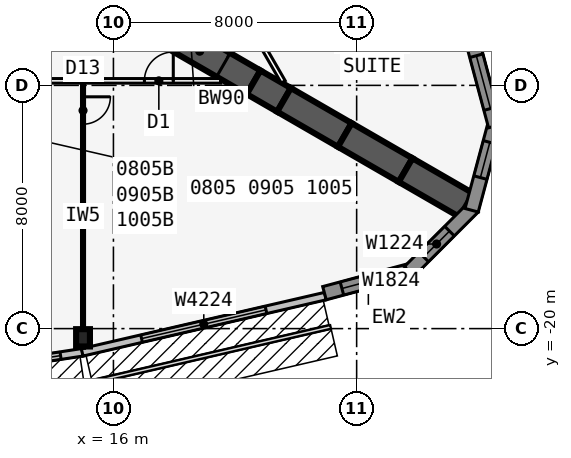
"""IFC4 building model, lengths in metres.
Left out: names, types, materials, properties, quantities, classifications, styles, units other than length and angle.
Written with IfcOpenShell. Run it as: python <this file> out.ifc"""

import sys

from ifc_helpers import new_model, si_unit, direction, frame, frame_2d, origin, origin_2d, place, context, subcontext, project, spatial, polyline, rectangle, i_section, outline, extrude, element, fill, save


model = new_model("IFC4")
c1 = context("Model", 3, precision=1e-05, world=origin(), true_north=direction((0.0, 1.0)))
c2 = subcontext(c1, "Body", "Model", "MODEL_VIEW")
j1 = project(units=[si_unit("LENGTHUNIT", "METRE"), si_unit("PLANEANGLEUNIT", "RADIAN")], contexts=[c1])
p1 = place(None, origin())
s1 = spatial("IfcSite", under=j1, at=p1, CompositionType="ELEMENT")
p2 = place(p1, origin())
s2 = spatial("IfcBuilding", under=s1, at=p2, CompositionType="ELEMENT")
p3 = place(p2, frame((0.0, 0.0, 38.7)))
s3 = spatial("IfcBuildingStorey", under=s2, at=p3, CompositionType="ELEMENT", Elevation=38.7)
p4 = place(p3, frame((16.5, -9.526, 0.0), z_axis=(0.0, 0.0, 1.0), x_axis=(0.866031398331, -0.499989616998, 0.0)))
e1 = element("IfcWall", 1, at=p4, inside=s3, PredefinedType="SHEAR", context=c2, shape_type="SweptSolid", body=[
    extrude(rectangle(XDim=4.746, YDim=0.9, at=frame_2d((2.373, 0.0))), origin(), (0.0, 0.0, 1.0), 3.4),
])
p5 = place(p4, frame((1.8, 0.0, 0.0)))
e2 = element("IfcOpeningElement", 2, at=p5, cuts=e1, PredefinedType="OPENING", context=c2, shape_type="SweptSolid", body=[
    extrude(rectangle(XDim=1.8, YDim=2.13, at=frame_2d((0.9, 1.065))), frame((0.0, 0.46, 0.0), z_axis=(0.0, -1.0, 0.0), x_axis=(1.0, 0.0, 0.0)), (0.0, 0.0, 1.0), 0.92),
])
p6 = place(p3, frame((20.61, -11.899, 0.0), z_axis=(0.0, 0.0, 1.0), x_axis=(0.866009537788, -0.500027479704, 0.0)))
e3 = element("IfcWall", 3, at=p6, inside=s3, PredefinedType="SHEAR", context=c2, shape_type="SweptSolid", body=[
    extrude(rectangle(XDim=1.155, YDim=0.9, at=frame_2d((0.577, 0.0))), origin(), (0.0, 0.0, 1.0), 3.4),
])
for number, where, z_axis, x_axis in (
    (4, (21.61, -12.477, 0.0), (0.0, 0.0, 1.0), (0.866, -0.5, 0.0)),
    (5, (23.61, -13.631, 0.0), (0.0, 0.0, 1.0), (0.866, -0.5, 0.0)),
    (6, (25.61, -14.786, 0.0), (0.0, 0.0, 1.0), (0.866, -0.5, 0.0)),
):
    element("IfcWall", number, at=place(p3, frame(where, z_axis=z_axis, x_axis=x_axis)), inside=s3, PredefinedType="SHEAR", context=c2, shape_type="SweptSolid", body=[
        extrude(rectangle(XDim=2.309, YDim=0.9, at=frame_2d((1.155, 0.0))), origin(), (0.0, 0.0, 1.0), 3.4),
    ])
p7 = place(p3, frame((15.0, -20.303, 0.0), z_axis=(0.0, 0.0, 1.0), x_axis=(1.0, 0.0, 0.0)))
e7 = element("IfcColumn", 7, at=p7, inside=s3, PredefinedType="COLUMN", context=c2, shape_type="SweptSolid", body=[
    extrude(i_section(OverallWidth=0.455, OverallDepth=0.569, WebThickness=0.078, FlangeThickness=0.125, at=origin_2d()), origin(), (0.0, 0.0, 1.0), 3.4),
])
p8 = place(p3, frame((9.981, -21.54, 0.0), z_axis=(0.0, 0.0, 1.0), x_axis=(0.988615403399, 0.150464561152, 0.0)))
e8 = element("IfcWall", 8, at=p8, inside=s3, PredefinedType="STANDARD", context=c2, shape_type="SweptSolid", body=[
    extrude(rectangle(XDim=5.058, YDim=0.25, at=frame_2d((2.529, 0.0))), origin(), (0.0, 0.0, 1.0), 3.235),
])
p9 = place(p8, frame((0.729, 0.0, 0.45)))
e9 = element("IfcOpeningElement", 9, at=p9, cuts=e8, PredefinedType="OPENING", context=c2, shape_type="SweptSolid", body=[
    extrude(rectangle(XDim=3.6, YDim=2.4, at=frame_2d((1.8, 1.2))), frame((0.0, 0.135, 0.0), z_axis=(0.0, -1.0, 0.0), x_axis=(1.0, 0.0, 0.0)), (0.0, 0.0, 1.0), 0.27),
])
p10 = place(p3, frame((14.972, -20.781, 0.0), z_axis=(0.0, 0.0, 1.0), x_axis=(0.974279327392, 0.225343720163, 0.0)))
e10 = element("IfcWall", 10, at=p10, inside=s3, PredefinedType="STANDARD", context=c2, shape_type="SweptSolid", body=[
    extrude(rectangle(XDim=8.211, YDim=0.25, at=frame_2d((4.105, 0.0))), origin(), (0.0, 0.0, 1.0), 3.235),
])
p11 = place(p10, frame((2.006, 0.0, 0.45)))
e11 = element("IfcOpeningElement", 11, at=p11, cuts=e10, PredefinedType="OPENING", context=c2, shape_type="SweptSolid", body=[
    extrude(rectangle(XDim=4.2, YDim=2.4, at=frame_2d((2.1, 1.2))), frame((0.0, 0.135, 0.0), z_axis=(0.0, -1.0, 0.0), x_axis=(1.0, 0.0, 0.0)), (0.0, 0.0, 1.0), 0.27),
])
p12 = place(p3, frame((22.942, -18.835, 0.0), z_axis=(0.0, 0.0, 1.0), x_axis=(0.965930548995, 0.258801419081, 0.0)))
e12 = element("IfcWall", 12, at=p12, inside=s3, PredefinedType="SOLIDWALL", context=c2, shape_type="SweptSolid", body=[
    extrude(rectangle(XDim=2.989, YDim=0.45, at=frame_2d((1.494, 0.0))), origin(), (0.0, 0.0, 1.0), 3.235),
])
p13 = place(p12, frame((0.594, 0.0, 0.45)))
e13 = element("IfcOpeningElement", 13, at=p13, cuts=e12, PredefinedType="OPENING", context=c2, shape_type="SweptSolid", body=[
    extrude(rectangle(XDim=1.8, YDim=2.4, at=frame_2d((0.9, 1.2))), frame((0.0, 0.235, 0.0), z_axis=(0.0, -1.0, 0.0), x_axis=(1.0, 0.0, 0.0)), (0.0, 0.0, 1.0), 0.47),
])
p14 = place(p3, frame((25.728, -18.12, 0.0), z_axis=(0.0, 0.0, 1.0), x_axis=(0.707025086683, 0.707188466253, 0.0)))
e14 = element("IfcWall", 14, at=p14, inside=s3, PredefinedType="SOLIDWALL", context=c2, shape_type="SweptSolid", body=[
    extrude(outline(polyline([(2.989, 0.225), (2.93, 0.225), (2.438, 0.093), (2.402, 0.225), (0.0, 0.225), (0.0, -0.225), (2.989, -0.225), (2.989, 0.225)])), origin(), (0.0, 0.0, 1.0), 3.235),
])
p15 = place(p14, frame((0.676, 0.0, 0.45)))
e15 = element("IfcOpeningElement", 15, at=p15, cuts=e14, PredefinedType="OPENING", context=c2, shape_type="SweptSolid", body=[
    extrude(rectangle(XDim=1.2, YDim=2.4, at=frame_2d((0.6, 1.2))), frame((0.0, 0.235, 0.0), z_axis=(0.0, -1.0, 0.0), x_axis=(1.0, 0.0, 0.0)), (0.0, 0.0, 1.0), 0.47),
])
p16 = place(p3, frame((27.783, -16.108, 0.0), z_axis=(0.0, 0.0, 1.0), x_axis=(0.258801419081, 0.965930548995, 0.0)))
e16 = element("IfcWall", 16, at=p16, inside=s3, PredefinedType="SOLIDWALL", context=c2, shape_type="SweptSolid", body=[
    extrude(outline(polyline([(2.989, 0.225), (0.586, 0.225), (0.551, 0.093), (0.06, 0.225), (0.0, 0.225), (0.0, -0.225), (2.989, -0.225), (2.989, 0.225)])), origin(), (0.0, 0.0, 1.0), 3.235),
])
p17 = place(p16, frame((1.113, 0.0, 0.45)))
e17 = element("IfcOpeningElement", 17, at=p17, cuts=e16, PredefinedType="OPENING", context=c2, shape_type="SweptSolid", body=[
    extrude(rectangle(XDim=1.2, YDim=2.4, at=frame_2d((0.6, 1.2))), frame((0.0, 0.235, 0.0), z_axis=(0.0, -1.0, 0.0), x_axis=(1.0, 0.0, 0.0)), (0.0, 0.0, 1.0), 0.47),
])
p18 = place(p3, frame((28.556, -13.337, 0.0), z_axis=(0.0, 0.0, 1.0), x_axis=(-0.258780998834, 0.965936019953, 0.0)))
e18 = element("IfcWall", 18, at=p18, inside=s3, PredefinedType="SOLIDWALL", context=c2, shape_type="SweptSolid", body=[
    extrude(rectangle(XDim=2.989, YDim=0.45, at=frame_2d((1.494, 0.0))), origin(), (0.0, 0.0, 1.0), 3.235),
])
p19 = place(p18, frame((0.594, 0.0, 0.45)))
e19 = element("IfcOpeningElement", 19, at=p19, cuts=e18, PredefinedType="OPENING", context=c2, shape_type="SweptSolid", body=[
    extrude(rectangle(XDim=1.8, YDim=2.4, at=frame_2d((0.9, 1.2))), frame((0.0, 0.235, 0.0), z_axis=(0.0, -1.0, 0.0), x_axis=(1.0, 0.0, 0.0)), (0.0, 0.0, 1.0), 0.47),
])
p20 = place(p3, frame((-19.527, -11.851, 0.0), z_axis=(0.0, 0.0, 1.0), x_axis=(1.0, 0.0, 0.0)))
e20 = element("IfcWall", 20, at=p20, inside=s3, PredefinedType="PARTITIONING", context=c2, shape_type="SweptSolid", body=[
    extrude(rectangle(XDim=39.054, YDim=0.15, at=frame_2d((19.527, 0.0))), origin(), (0.0, 0.0, 1.0), 3.235),
])
p21 = place(p20, frame((0.352, 0.0, 0.0)))
e21 = element("IfcOpeningElement", 21, at=p21, cuts=e20, PredefinedType="OPENING", context=c2, shape_type="SweptSolid", body=[
    extrude(rectangle(XDim=0.95, YDim=2.13, at=frame_2d((0.475, 1.065))), frame((0.0, 0.085, 0.0), z_axis=(0.0, -1.0, 0.0), x_axis=(1.0, 0.0, 0.0)), (0.0, 0.0, 1.0), 0.17),
])
p22 = place(p20, frame((5.352, 0.0, 0.0)))
e22 = element("IfcOpeningElement", 22, at=p22, cuts=e20, PredefinedType="OPENING", context=c2, shape_type="SweptSolid", body=[
    extrude(rectangle(XDim=0.95, YDim=2.13, at=frame_2d((0.475, 1.065))), frame((0.0, 0.085, 0.0), z_axis=(0.0, -1.0, 0.0), x_axis=(1.0, 0.0, 0.0)), (0.0, 0.0, 1.0), 0.17),
])
p23 = place(p20, frame((12.752, 0.0, 0.0)))
e23 = element("IfcOpeningElement", 23, at=p23, cuts=e20, PredefinedType="OPENING", context=c2, shape_type="SweptSolid", body=[
    extrude(rectangle(XDim=0.95, YDim=2.13, at=frame_2d((0.475, 1.065))), frame((0.0, 0.085, 0.0), z_axis=(0.0, -1.0, 0.0), x_axis=(1.0, 0.0, 0.0)), (0.0, 0.0, 1.0), 0.17),
])
p24 = place(p20, frame((21.527, 0.0, 0.0)))
e24 = element("IfcOpeningElement", 24, at=p24, cuts=e20, PredefinedType="OPENING", context=c2, shape_type="SweptSolid", body=[
    extrude(rectangle(XDim=1.0, YDim=2.13, at=frame_2d((0.5, 1.065))), frame((0.0, 0.085, 0.0), z_axis=(0.0, -1.0, 0.0), x_axis=(1.0, 0.0, 0.0)), (0.0, 0.0, 1.0), 0.17),
])
p25 = place(p20, frame((25.952, 0.0, 0.0)))
e25 = element("IfcOpeningElement", 25, at=p25, cuts=e20, PredefinedType="OPENING", context=c2, shape_type="SweptSolid", body=[
    extrude(rectangle(XDim=0.95, YDim=2.13, at=frame_2d((0.475, 1.065))), frame((0.0, 0.085, 0.0), z_axis=(0.0, -1.0, 0.0), x_axis=(1.0, 0.0, 0.0)), (0.0, 0.0, 1.0), 0.17),
])
p26 = place(p20, frame((36.546, 0.0, 0.0)))
e26 = element("IfcOpeningElement", 26, at=p26, cuts=e20, PredefinedType="OPENING", context=c2, shape_type="SweptSolid", body=[
    extrude(rectangle(XDim=0.95, YDim=2.13, at=frame_2d((0.475, 1.065))), frame((0.0, 0.085, 0.0), z_axis=(0.0, -1.0, 0.0), x_axis=(1.0, 0.0, 0.0)), (0.0, 0.0, 1.0), 0.17),
])
p27 = place(p3, frame((15.0, -11.926, 0.0), z_axis=(0.0, 0.0, 1.0), x_axis=(0.0, -1.0, 0.0)))
e27 = element("IfcWall", 27, at=p27, inside=s3, PredefinedType="PARTITIONING", context=c2, shape_type="SweptSolid", body=[
    extrude(rectangle(XDim=8.72, YDim=0.1, at=frame_2d((4.36, 0.0))), origin(), (0.0, 0.0, 1.0), 2.389),
])
p28 = place(p27, frame((0.45, 0.0, 0.0)))
e28 = element("IfcOpeningElement", 28, at=p28, cuts=e27, PredefinedType="OPENING", context=c2, shape_type="SweptSolid", body=[
    extrude(rectangle(XDim=0.9, YDim=2.13, at=frame_2d((0.45, 1.065))), frame((0.0, 0.06, 0.0), z_axis=(0.0, -1.0, 0.0), x_axis=(1.0, 0.0, 0.0)), (0.0, 0.0, 1.0), 0.12),
])
p29 = place(p3, frame((21.586, -11.885, 0.0), z_axis=(0.0, 0.0, 1.0), x_axis=(-0.500001915564, 0.86602429783, 0.0)))
e29 = element("IfcWall", 29, at=p29, inside=s3, PredefinedType="PARTITIONING", context=c2, shape_type="SweptSolid", body=[
    extrude(rectangle(XDim=42.172, YDim=0.15, at=frame_2d((21.086, 0.0))), origin(), (0.0, 0.0, 1.0), 3.235),
])
p30 = place(p29, frame((1.911, 0.0, 0.0)))
e30 = element("IfcOpeningElement", 30, at=p30, cuts=e29, PredefinedType="OPENING", context=c2, shape_type="SweptSolid", body=[
    extrude(rectangle(XDim=0.95, YDim=2.13, at=frame_2d((0.475, 1.065))), frame((0.0, 0.085, 0.0), z_axis=(0.0, -1.0, 0.0), x_axis=(1.0, 0.0, 0.0)), (0.0, 0.0, 1.0), 0.17),
])
p31 = place(p29, frame((7.511, 0.0, 0.0)))
e31 = element("IfcOpeningElement", 31, at=p31, cuts=e29, PredefinedType="OPENING", context=c2, shape_type="SweptSolid", body=[
    extrude(rectangle(XDim=0.95, YDim=2.13, at=frame_2d((0.475, 1.065))), frame((0.0, 0.085, 0.0), z_axis=(0.0, -1.0, 0.0), x_axis=(1.0, 0.0, 0.0)), (0.0, 0.0, 1.0), 0.17),
])
p32 = place(p29, frame((13.711, 0.0, 0.0)))
e32 = element("IfcOpeningElement", 32, at=p32, cuts=e29, PredefinedType="OPENING", context=c2, shape_type="SweptSolid", body=[
    extrude(rectangle(XDim=0.95, YDim=2.13, at=frame_2d((0.475, 1.065))), frame((0.0, 0.085, 0.0), z_axis=(0.0, -1.0, 0.0), x_axis=(1.0, 0.0, 0.0)), (0.0, 0.0, 1.0), 0.17),
])
p33 = place(p29, frame((21.911, 0.0, 0.0)))
e33 = element("IfcOpeningElement", 33, at=p33, cuts=e29, PredefinedType="OPENING", context=c2, shape_type="SweptSolid", body=[
    extrude(rectangle(XDim=0.95, YDim=2.13, at=frame_2d((0.475, 1.065))), frame((0.0, 0.085, 0.0), z_axis=(0.0, -1.0, 0.0), x_axis=(1.0, 0.0, 0.0)), (0.0, 0.0, 1.0), 0.17),
])
p34 = place(p29, frame((28.711, 0.0, 0.0)))
e34 = element("IfcOpeningElement", 34, at=p34, cuts=e29, PredefinedType="OPENING", context=c2, shape_type="SweptSolid", body=[
    extrude(rectangle(XDim=0.95, YDim=2.13, at=frame_2d((0.475, 1.065))), frame((0.0, 0.085, 0.0), z_axis=(0.0, -1.0, 0.0), x_axis=(1.0, 0.0, 0.0)), (0.0, 0.0, 1.0), 0.17),
])
p35 = place(p29, frame((31.911, 0.0, 0.0)))
e35 = element("IfcOpeningElement", 35, at=p35, cuts=e29, PredefinedType="OPENING", context=c2, shape_type="SweptSolid", body=[
    extrude(rectangle(XDim=0.95, YDim=2.13, at=frame_2d((0.475, 1.065))), frame((0.0, 0.085, 0.0), z_axis=(0.0, -1.0, 0.0), x_axis=(1.0, 0.0, 0.0)), (0.0, 0.0, 1.0), 0.17),
])
p36 = place(p29, frame((39.311, 0.0, 0.0)))
e36 = element("IfcOpeningElement", 36, at=p36, cuts=e29, PredefinedType="OPENING", context=c2, shape_type="SweptSolid", body=[
    extrude(rectangle(XDim=0.95, YDim=2.13, at=frame_2d((0.475, 1.065))), frame((0.0, 0.085, 0.0), z_axis=(0.0, -1.0, 0.0), x_axis=(1.0, 0.0, 0.0)), (0.0, 0.0, 1.0), 0.17),
])
p37 = place(p9, origin())
e37 = element("IfcWindow", 37, at=p37, inside=s3, PartitioningType="SINGLE_PANEL", PredefinedType="WINDOW", context=c2, shape_type="SweptSolid", body=[
    extrude(rectangle(XDim=3.6, YDim=2.4, at=frame_2d((1.8, 1.2))), frame((0.0, 0.03, 0.0), z_axis=(0.0, -1.0, 0.0), x_axis=(1.0, 0.0, 0.0)), (0.0, 0.0, 1.0), 0.06),
])
fill(e9, e37)
p38 = place(p11, origin())
e38 = element("IfcWindow", 38, at=p38, inside=s3, PartitioningType="SINGLE_PANEL", PredefinedType="WINDOW", context=c2, shape_type="SweptSolid", body=[
    extrude(rectangle(XDim=4.2, YDim=2.4, at=frame_2d((2.1, 1.2))), frame((0.0, 0.03, 0.0), z_axis=(0.0, -1.0, 0.0), x_axis=(1.0, 0.0, 0.0)), (0.0, 0.0, 1.0), 0.06),
])
fill(e11, e38)
p39 = place(p13, origin())
e39 = element("IfcWindow", 39, at=p39, inside=s3, PartitioningType="SINGLE_PANEL", PredefinedType="WINDOW", context=c2, shape_type="SweptSolid", body=[
    extrude(rectangle(XDim=1.8, YDim=2.4, at=frame_2d((0.9, 1.2))), frame((0.0, 0.03, 0.0), z_axis=(0.0, -1.0, 0.0), x_axis=(1.0, 0.0, 0.0)), (0.0, 0.0, 1.0), 0.06),
])
fill(e13, e39)
p40 = place(p15, origin())
e40 = element("IfcWindow", 40, at=p40, inside=s3, PartitioningType="SINGLE_PANEL", PredefinedType="WINDOW", context=c2, shape_type="SweptSolid", body=[
    extrude(rectangle(XDim=1.2, YDim=2.4, at=frame_2d((0.6, 1.2))), frame((0.0, 0.03, 0.0), z_axis=(0.0, -1.0, 0.0), x_axis=(1.0, 0.0, 0.0)), (0.0, 0.0, 1.0), 0.06),
])
fill(e15, e40)
p41 = place(p17, origin())
e41 = element("IfcWindow", 41, at=p41, inside=s3, PartitioningType="SINGLE_PANEL", PredefinedType="WINDOW", context=c2, shape_type="SweptSolid", body=[
    extrude(rectangle(XDim=1.2, YDim=2.4, at=frame_2d((0.6, 1.2))), frame((0.0, 0.03, 0.0), z_axis=(0.0, -1.0, 0.0), x_axis=(1.0, 0.0, 0.0)), (0.0, 0.0, 1.0), 0.06),
])
fill(e17, e41)
p42 = place(p19, origin())
e42 = element("IfcWindow", 42, at=p42, inside=s3, PartitioningType="SINGLE_PANEL", PredefinedType="WINDOW", context=c2, shape_type="SweptSolid", body=[
    extrude(rectangle(XDim=1.8, YDim=2.4, at=frame_2d((0.9, 1.2))), frame((0.0, 0.03, 0.0), z_axis=(0.0, -1.0, 0.0), x_axis=(1.0, 0.0, 0.0)), (0.0, 0.0, 1.0), 0.06),
])
fill(e19, e42)
p43 = place(p28, origin())
e43 = element("IfcDoor", 43, at=p43, inside=s3, OperationType="SINGLE_SWING_LEFT", PredefinedType="DOOR", context=c2, shape_type="SweptSolid", body=[
    extrude(rectangle(XDim=0.9, YDim=2.13, at=frame_2d((0.45, 1.065))), frame((0.0, 0.025, 0.0), z_axis=(0.0, -1.0, 0.0), x_axis=(1.0, 0.0, 0.0)), (0.0, 0.0, 1.0), 0.05),
])
fill(e28, e43)
p44 = place(p26, origin())
e44 = element("IfcDoor", 44, at=p44, inside=s3, OperationType="SINGLE_SWING_RIGHT", PredefinedType="DOOR", context=c2, shape_type="SweptSolid", body=[
    extrude(rectangle(XDim=0.95, YDim=2.13, at=frame_2d((0.475, 1.065))), frame((0.0, 0.025, 0.0), z_axis=(0.0, -1.0, 0.0), x_axis=(1.0, 0.0, 0.0)), (0.0, 0.0, 1.0), 0.05),
])
fill(e26, e44)
p45 = place(p5, origin())
e45 = element("IfcDoor", 45, at=p45, inside=s3, OperationType="DOUBLE_DOOR_DOUBLE_SWING", PredefinedType="DOOR", context=c2, shape_type="SweptSolid", body=[
    extrude(rectangle(XDim=1.8, YDim=2.13, at=frame_2d((0.9, 1.065))), frame((0.0, 0.025, 0.0), z_axis=(0.0, -1.0, 0.0), x_axis=(1.0, 0.0, 0.0)), (0.0, 0.0, 1.0), 0.05),
])
fill(e2, e45)
save(model, sys.argv[1])
